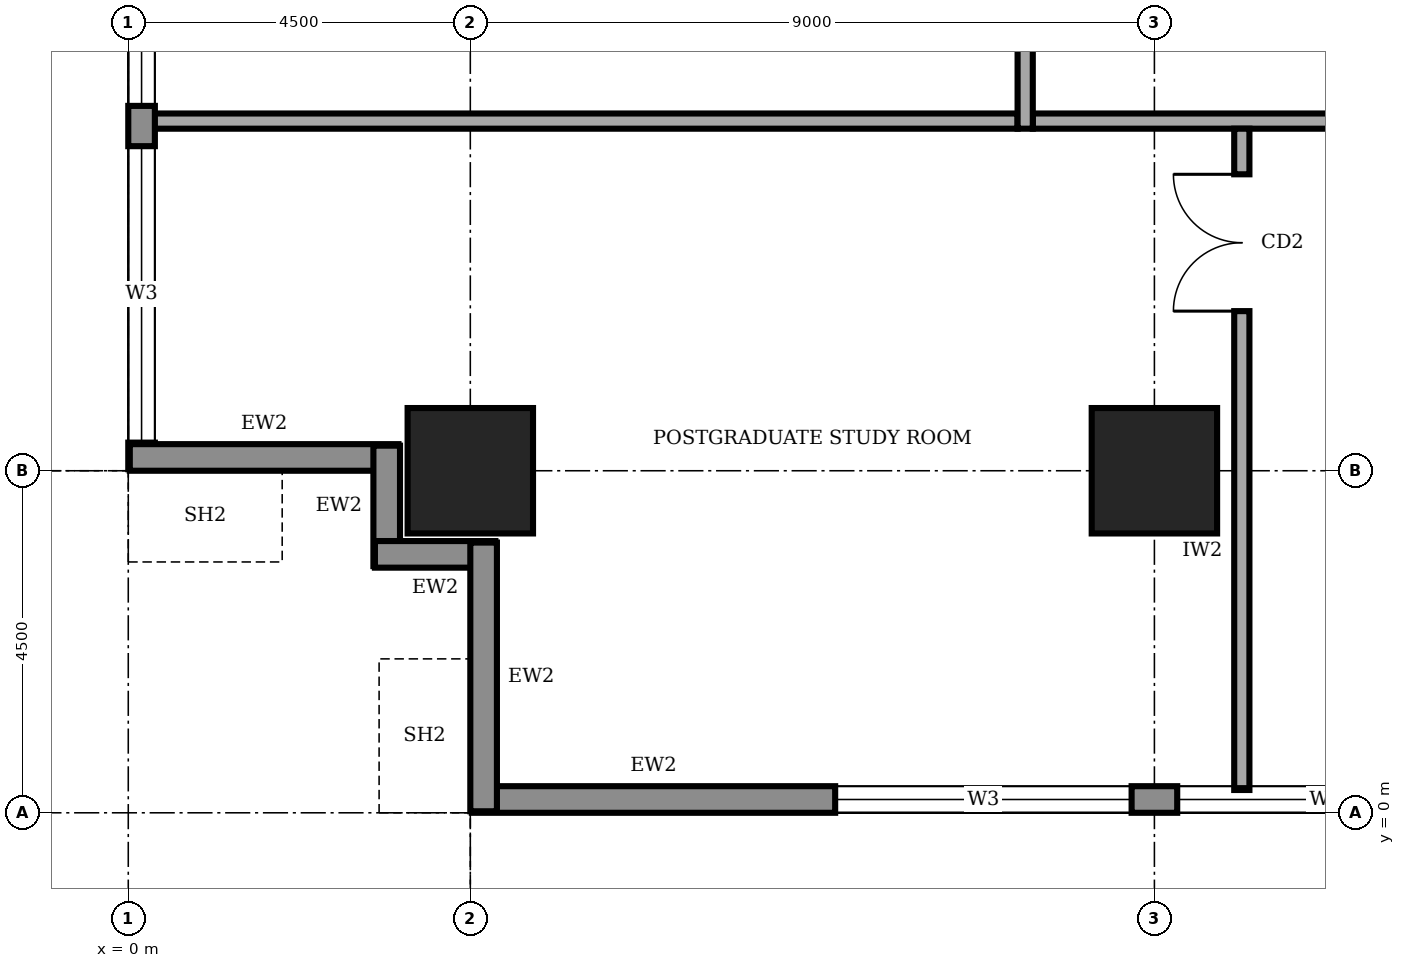
"""IFC4 building model, lengths in metres.
Left out: names, types, materials, properties, quantities, classifications, styles, units other than length and angle.
Written with IfcOpenShell. Run it as: python <this file> out.ifc"""

import sys

from ifc_helpers import new_model, si_unit, direction, frame, frame_2d, origin, origin_2d, place, context, subcontext, project, spatial, rectangle, extrude, element, fill, save


model = new_model("IFC4")
c1 = context("Model", 3, precision=1e-05, world=origin(), true_north=direction((0.0, 1.0)))
c2 = subcontext(c1, "Body", "Model", "MODEL_VIEW")
j1 = project(units=[si_unit("LENGTHUNIT", "METRE"), si_unit("PLANEANGLEUNIT", "RADIAN")], contexts=[c1])
p1 = place(None, origin())
s1 = spatial("IfcSite", under=j1, at=p1, CompositionType="ELEMENT")
p2 = place(p1, origin())
s2 = spatial("IfcBuilding", under=s1, at=p2, CompositionType="ELEMENT")
p3 = place(p2, frame((0.0, 0.0, 185.0)))
s3 = spatial("IfcBuildingStorey", under=s2, at=p3, CompositionType="ELEMENT", Elevation=185.0)
for number, where, z_axis, x_axis in (
    (1, (4.5, 4.5, 0.0), (0.0, 0.0, 1.0), (1.0, 0.0, 0.0)),
    (2, (13.5, 4.5, 0.0), (0.0, 0.0, 1.0), (1.0, 0.0, 0.0)),
):
    element("IfcColumn", number, at=place(p3, frame(where, z_axis=z_axis, x_axis=x_axis)), inside=s3, PredefinedType="COLUMN", context=c2, shape_type="SweptSolid", body=[
        extrude(rectangle(XDim=1.65, YDim=1.65, at=origin_2d()), origin(), (0.0, 0.0, 1.0), 4.0),
    ])
p4 = place(p3, frame((4.52, 0.175, 0.0), z_axis=(0.0, 0.0, 1.0), x_axis=(1.0, 0.0, 0.0)))
e3 = element("IfcWall", 3, at=p4, inside=s3, PredefinedType="STANDARD", context=c2, shape_type="SweptSolid", body=[
    extrude(rectangle(XDim=31.46, YDim=0.35, at=frame_2d((15.73, 0.0))), origin(), (0.0, 0.0, 1.0), 3.75),
])
p5 = place(p4, frame((4.78, 0.0, 0.95)))
e4 = element("IfcOpeningElement", 4, at=p5, cuts=e3, PredefinedType="OPENING", context=c2, shape_type="SweptSolid", body=[
    extrude(rectangle(XDim=3.9, YDim=1.8, at=frame_2d((1.95, 0.9))), frame((0.0, 0.185, 0.0), z_axis=(0.0, -1.0, 0.0), x_axis=(1.0, 0.0, 0.0)), (0.0, 0.0, 1.0), 0.37),
])
p6 = place(p4, frame((9.28, 0.0, 0.95)))
e5 = element("IfcOpeningElement", 5, at=p6, cuts=e3, PredefinedType="OPENING", context=c2, shape_type="SweptSolid", body=[
    extrude(rectangle(XDim=3.9, YDim=1.8, at=frame_2d((1.95, 0.9))), frame((0.0, 0.185, 0.0), z_axis=(0.0, -1.0, 0.0), x_axis=(1.0, 0.0, 0.0)), (0.0, 0.0, 1.0), 0.37),
])
p7 = place(p4, frame((13.78, 0.0, 0.95)))
e6 = element("IfcOpeningElement", 6, at=p7, cuts=e3, PredefinedType="OPENING", context=c2, shape_type="SweptSolid", body=[
    extrude(rectangle(XDim=3.9, YDim=1.8, at=frame_2d((1.95, 0.9))), frame((0.0, 0.185, 0.0), z_axis=(0.0, -1.0, 0.0), x_axis=(1.0, 0.0, 0.0)), (0.0, 0.0, 1.0), 0.37),
])
p8 = place(p4, frame((18.28, 0.0, 0.95)))
e7 = element("IfcOpeningElement", 7, at=p8, cuts=e3, PredefinedType="OPENING", context=c2, shape_type="SweptSolid", body=[
    extrude(rectangle(XDim=3.9, YDim=1.8, at=frame_2d((1.95, 0.9))), frame((0.0, 0.185, 0.0), z_axis=(0.0, -1.0, 0.0), x_axis=(1.0, 0.0, 0.0)), (0.0, 0.0, 1.0), 0.37),
])
p9 = place(p4, frame((22.78, 0.0, 0.95)))
e8 = element("IfcOpeningElement", 8, at=p9, cuts=e3, PredefinedType="OPENING", context=c2, shape_type="SweptSolid", body=[
    extrude(rectangle(XDim=3.9, YDim=1.8, at=frame_2d((1.95, 0.9))), frame((0.0, 0.185, 0.0), z_axis=(0.0, -1.0, 0.0), x_axis=(1.0, 0.0, 0.0)), (0.0, 0.0, 1.0), 0.37),
])
p10 = place(p4, frame((27.21, 0.0, 0.95)))
e9 = element("IfcOpeningElement", 9, at=p10, cuts=e3, PredefinedType="OPENING", context=c2, shape_type="SweptSolid", body=[
    extrude(rectangle(XDim=3.9, YDim=1.8, at=frame_2d((1.95, 0.9))), frame((0.0, 0.185, 0.0), z_axis=(0.0, -1.0, 0.0), x_axis=(1.0, 0.0, 0.0)), (0.0, 0.0, 1.0), 0.37),
])
p11 = place(p3, frame((0.175, 35.98, 0.0), z_axis=(0.0, 0.0, 1.0), x_axis=(0.0, -1.0, 0.0)))
e10 = element("IfcWall", 10, at=p11, inside=s3, PredefinedType="STANDARD", context=c2, shape_type="SweptSolid", body=[
    extrude(rectangle(XDim=31.46, YDim=0.35, at=frame_2d((15.73, 0.0))), origin(), (0.0, 0.0, 1.0), 3.75),
])
p12 = place(p11, frame((27.21, 0.0, 0.95)))
e11 = element("IfcOpeningElement", 11, at=p12, cuts=e10, PredefinedType="OPENING", context=c2, shape_type="SweptSolid", body=[
    extrude(rectangle(XDim=3.9, YDim=1.8, at=frame_2d((1.95, 0.9))), frame((0.0, 0.185, 0.0), z_axis=(0.0, -1.0, 0.0), x_axis=(1.0, 0.0, 0.0)), (0.0, 0.0, 1.0), 0.37),
])
p13 = place(p11, frame((22.78, 0.0, 0.95)))
e12 = element("IfcOpeningElement", 12, at=p13, cuts=e10, PredefinedType="OPENING", context=c2, shape_type="SweptSolid", body=[
    extrude(rectangle(XDim=3.9, YDim=1.8, at=frame_2d((1.95, 0.9))), frame((0.0, 0.185, 0.0), z_axis=(0.0, -1.0, 0.0), x_axis=(1.0, 0.0, 0.0)), (0.0, 0.0, 1.0), 0.37),
])
p14 = place(p11, frame((18.28, 0.0, 0.95)))
e13 = element("IfcOpeningElement", 13, at=p14, cuts=e10, PredefinedType="OPENING", context=c2, shape_type="SweptSolid", body=[
    extrude(rectangle(XDim=3.9, YDim=1.8, at=frame_2d((1.95, 0.9))), frame((0.0, 0.185, 0.0), z_axis=(0.0, -1.0, 0.0), x_axis=(1.0, 0.0, 0.0)), (0.0, 0.0, 1.0), 0.37),
])
p15 = place(p11, frame((13.78, 0.0, 0.95)))
e14 = element("IfcOpeningElement", 14, at=p15, cuts=e10, PredefinedType="OPENING", context=c2, shape_type="SweptSolid", body=[
    extrude(rectangle(XDim=3.9, YDim=1.8, at=frame_2d((1.95, 0.9))), frame((0.0, 0.185, 0.0), z_axis=(0.0, -1.0, 0.0), x_axis=(1.0, 0.0, 0.0)), (0.0, 0.0, 1.0), 0.37),
])
p16 = place(p11, frame((9.28, 0.0, 0.95)))
e15 = element("IfcOpeningElement", 15, at=p16, cuts=e10, PredefinedType="OPENING", context=c2, shape_type="SweptSolid", body=[
    extrude(rectangle(XDim=3.9, YDim=1.8, at=frame_2d((1.95, 0.9))), frame((0.0, 0.185, 0.0), z_axis=(0.0, -1.0, 0.0), x_axis=(1.0, 0.0, 0.0)), (0.0, 0.0, 1.0), 0.37),
])
p17 = place(p11, frame((4.78, 0.0, 0.95)))
e16 = element("IfcOpeningElement", 16, at=p17, cuts=e10, PredefinedType="OPENING", context=c2, shape_type="SweptSolid", body=[
    extrude(rectangle(XDim=3.9, YDim=1.8, at=frame_2d((1.95, 0.9))), frame((0.0, 0.185, 0.0), z_axis=(0.0, -1.0, 0.0), x_axis=(1.0, 0.0, 0.0)), (0.0, 0.0, 1.0), 0.37),
])
p18 = place(p3, frame((0.02, 4.675, 0.0), z_axis=(0.0, 0.0, 1.0), x_axis=(1.0, 0.0, 0.0)))
e17 = element("IfcWall", 17, at=p18, inside=s3, PredefinedType="STANDARD", context=c2, shape_type="SweptSolid", body=[
    extrude(rectangle(XDim=3.535, YDim=0.35, at=frame_2d((1.768, 0.0))), origin(), (0.0, 0.0, 1.0), 2.85),
])
for number, where, z_axis, x_axis in (
    (18, (3.4, 4.83, 0.0), (0.0, 0.0, 1.0), (0.0, -1.0, 0.0)),
    (19, (3.245, 3.4, 0.0), (0.0, 0.0, 1.0), (1.0, 0.0, 0.0)),
):
    element("IfcWall", number, at=place(p3, frame(where, z_axis=z_axis, x_axis=x_axis)), inside=s3, PredefinedType="STANDARD", context=c2, shape_type="SweptSolid", body=[
        extrude(rectangle(XDim=1.585, YDim=0.35, at=frame_2d((0.792, 0.0))), origin(), (0.0, 0.0, 1.0), 3.75),
    ])
p19 = place(p3, frame((4.675, 3.555, 0.0), z_axis=(0.0, 0.0, 1.0), x_axis=(0.0, -1.0, 0.0)))
e20 = element("IfcWall", 20, at=p19, inside=s3, PredefinedType="STANDARD", context=c2, shape_type="SweptSolid", body=[
    extrude(rectangle(XDim=3.535, YDim=0.35, at=frame_2d((1.768, 0.0))), origin(), (0.0, 0.0, 1.0), 2.85),
])
p20 = place(p3, frame((11.9, 9.1, 0.0), z_axis=(0.0, 0.0, 1.0), x_axis=(1.0, 0.0, 0.0)))
e21 = element("IfcWall", 21, at=p20, inside=s3, PredefinedType="SOLIDWALL", context=c2, shape_type="SweptSolid", body=[
    extrude(rectangle(XDim=16.9, YDim=0.2, at=frame_2d((8.45, 0.0))), origin(), (0.0, 0.0, 1.0), 3.75),
])
p21 = place(p20, frame((15.425, 0.0, 0.0)))
e22 = element("IfcOpeningElement", 22, at=p21, cuts=e21, PredefinedType="OPENING", context=c2, shape_type="SweptSolid", body=[
    extrude(rectangle(XDim=1.0, YDim=2.1, at=frame_2d((0.5, 1.05))), frame((0.0, 0.11, 0.0), z_axis=(0.0, -1.0, 0.0), x_axis=(1.0, 0.0, 0.0)), (0.0, 0.0, 1.0), 0.22),
])
p22 = place(p3, frame((11.8, 31.3, 0.0), z_axis=(0.0, 0.0, 1.0), x_axis=(0.0, -1.0, 0.0)))
e23 = element("IfcWall", 23, at=p22, inside=s3, PredefinedType="SOLIDWALL", context=c2, shape_type="SweptSolid", body=[
    extrude(rectangle(XDim=22.3, YDim=0.2, at=frame_2d((11.15, 0.0))), origin(), (0.0, 0.0, 1.0), 3.75),
])
p23 = place(p22, frame((19.55, 0.0, 0.0)))
e24 = element("IfcOpeningElement", 24, at=p23, cuts=e23, PredefinedType="OPENING", context=c2, shape_type="SweptSolid", body=[
    extrude(rectangle(XDim=1.0, YDim=2.1, at=frame_2d((0.5, 1.05))), frame((0.0, 0.11, 0.0), z_axis=(0.0, -1.0, 0.0), x_axis=(1.0, 0.0, 0.0)), (0.0, 0.0, 1.0), 0.22),
])
p24 = place(p22, frame((15.65, 0.0, 0.0)))
e25 = element("IfcOpeningElement", 25, at=p24, cuts=e23, PredefinedType="OPENING", context=c2, shape_type="SweptSolid", body=[
    extrude(rectangle(XDim=0.9, YDim=2.1, at=frame_2d((0.45, 1.05))), frame((0.0, 0.11, 0.0), z_axis=(0.0, -1.0, 0.0), x_axis=(1.0, 0.0, 0.0)), (0.0, 0.0, 1.0), 0.22),
])
p25 = place(p22, frame((10.85, 0.0, 0.0)))
e26 = element("IfcOpeningElement", 26, at=p25, cuts=e23, PredefinedType="OPENING", context=c2, shape_type="SweptSolid", body=[
    extrude(rectangle(XDim=0.9, YDim=2.1, at=frame_2d((0.45, 1.05))), frame((0.0, 0.11, 0.0), z_axis=(0.0, -1.0, 0.0), x_axis=(1.0, 0.0, 0.0)), (0.0, 0.0, 1.0), 0.22),
])
p26 = place(p22, frame((7.8, 0.0, 0.0)))
e27 = element("IfcOpeningElement", 27, at=p26, cuts=e23, PredefinedType="OPENING", context=c2, shape_type="SweptSolid", body=[
    extrude(rectangle(XDim=0.9, YDim=2.1, at=frame_2d((0.45, 1.05))), frame((0.0, 0.11, 0.0), z_axis=(0.0, -1.0, 0.0), x_axis=(1.0, 0.0, 0.0)), (0.0, 0.0, 1.0), 0.22),
])
p27 = place(p22, frame((4.8, 0.0, 0.0)))
e28 = element("IfcOpeningElement", 28, at=p27, cuts=e23, PredefinedType="OPENING", context=c2, shape_type="SweptSolid", body=[
    extrude(rectangle(XDim=1.0, YDim=2.1, at=frame_2d((0.5, 1.05))), frame((0.0, 0.11, 0.0), z_axis=(0.0, -1.0, 0.0), x_axis=(1.0, 0.0, 0.0)), (0.0, 0.0, 1.0), 0.22),
])
p28 = place(p22, frame((12.9, 0.0, 0.0)))
e29 = element("IfcOpeningElement", 29, at=p28, cuts=e23, PredefinedType="OPENING", context=c2, shape_type="SweptSolid", body=[
    extrude(rectangle(XDim=1.0, YDim=2.1, at=frame_2d((0.5, 1.05))), frame((0.0, 0.11, 0.0), z_axis=(0.0, -1.0, 0.0), x_axis=(1.0, 0.0, 0.0)), (0.0, 0.0, 1.0), 0.22),
])
p29 = place(p22, frame((1.55, 0.0, 0.0)))
e30 = element("IfcOpeningElement", 30, at=p29, cuts=e23, PredefinedType="OPENING", context=c2, shape_type="SweptSolid", body=[
    extrude(rectangle(XDim=1.0, YDim=2.1, at=frame_2d((0.5, 1.05))), frame((0.0, 0.11, 0.0), z_axis=(0.0, -1.0, 0.0), x_axis=(1.0, 0.0, 0.0)), (0.0, 0.0, 1.0), 0.22),
])
p30 = place(p3, frame((14.65, 0.3, 0.0), z_axis=(0.0, 0.0, 1.0), x_axis=(0.0, 1.0, 0.0)))
e31 = element("IfcWall", 31, at=p30, inside=s3, PredefinedType="SOLIDWALL", context=c2, shape_type="SweptSolid", body=[
    extrude(rectangle(XDim=8.7, YDim=0.2, at=frame_2d((4.35, 0.0))), origin(), (0.0, 0.0, 1.0), 3.75),
])
p31 = place(p30, frame((6.3, 0.0, 0.0)))
e32 = element("IfcOpeningElement", 32, at=p31, cuts=e31, PredefinedType="OPENING", context=c2, shape_type="SweptSolid", body=[
    extrude(rectangle(XDim=1.8, YDim=2.1, at=frame_2d((0.9, 1.05))), frame((0.0, 0.11, 0.0), z_axis=(0.0, -1.0, 0.0), x_axis=(1.0, 0.0, 0.0)), (0.0, 0.0, 1.0), 0.22),
])
p32 = place(p3, frame((0.3, 9.1, 0.0), z_axis=(0.0, 0.0, 1.0), x_axis=(1.0, 0.0, 0.0)))
e33 = element("IfcWall", 33, at=p32, inside=s3, PredefinedType="SOLIDWALL", context=c2, shape_type="SweptSolid", body=[
    extrude(rectangle(XDim=11.4, YDim=0.2, at=frame_2d((5.7, 0.0))), origin(), (0.0, 0.0, 1.0), 3.75),
])
p33 = place(p5, origin())
e34 = element("IfcWindow", 34, at=p33, inside=s3, PartitioningType="SINGLE_PANEL", PredefinedType="WINDOW", context=c2, shape_type="SweptSolid", body=[
    extrude(rectangle(XDim=3.9, YDim=1.8, at=frame_2d((1.95, 0.9))), frame((0.0, 0.03, 0.0), z_axis=(0.0, -1.0, 0.0), x_axis=(1.0, 0.0, 0.0)), (0.0, 0.0, 1.0), 0.06),
])
fill(e4, e34)
p34 = place(p6, origin())
e35 = element("IfcWindow", 35, at=p34, inside=s3, PartitioningType="SINGLE_PANEL", PredefinedType="WINDOW", context=c2, shape_type="SweptSolid", body=[
    extrude(rectangle(XDim=3.9, YDim=1.8, at=frame_2d((1.95, 0.9))), frame((0.0, 0.03, 0.0), z_axis=(0.0, -1.0, 0.0), x_axis=(1.0, 0.0, 0.0)), (0.0, 0.0, 1.0), 0.06),
])
fill(e5, e35)
p35 = place(p12, origin())
e36 = element("IfcWindow", 36, at=p35, inside=s3, PartitioningType="SINGLE_PANEL", PredefinedType="WINDOW", context=c2, shape_type="SweptSolid", body=[
    extrude(rectangle(XDim=3.9, YDim=1.8, at=frame_2d((1.95, 0.9))), frame((0.0, 0.03, 0.0), z_axis=(0.0, -1.0, 0.0), x_axis=(1.0, 0.0, 0.0)), (0.0, 0.0, 1.0), 0.06),
])
fill(e11, e36)
p36 = place(p13, origin())
e37 = element("IfcWindow", 37, at=p36, inside=s3, PartitioningType="SINGLE_PANEL", PredefinedType="WINDOW", context=c2, shape_type="SweptSolid", body=[
    extrude(rectangle(XDim=3.9, YDim=1.8, at=frame_2d((1.95, 0.9))), frame((0.0, 0.03, 0.0), z_axis=(0.0, -1.0, 0.0), x_axis=(1.0, 0.0, 0.0)), (0.0, 0.0, 1.0), 0.06),
])
fill(e12, e37)
p37 = place(p31, origin())
e38 = element("IfcDoor", 38, at=p37, inside=s3, OperationType="DOUBLE_DOOR_SINGLE_SWING", PredefinedType="DOOR", context=c2, shape_type="SweptSolid", body=[
    extrude(rectangle(XDim=1.8, YDim=2.1, at=frame_2d((0.9, 1.05))), frame((0.0, 0.025, 0.0), z_axis=(0.0, -1.0, 0.0), x_axis=(1.0, 0.0, 0.0)), (0.0, 0.0, 1.0), 0.05),
])
fill(e32, e38)
save(model, sys.argv[1])
